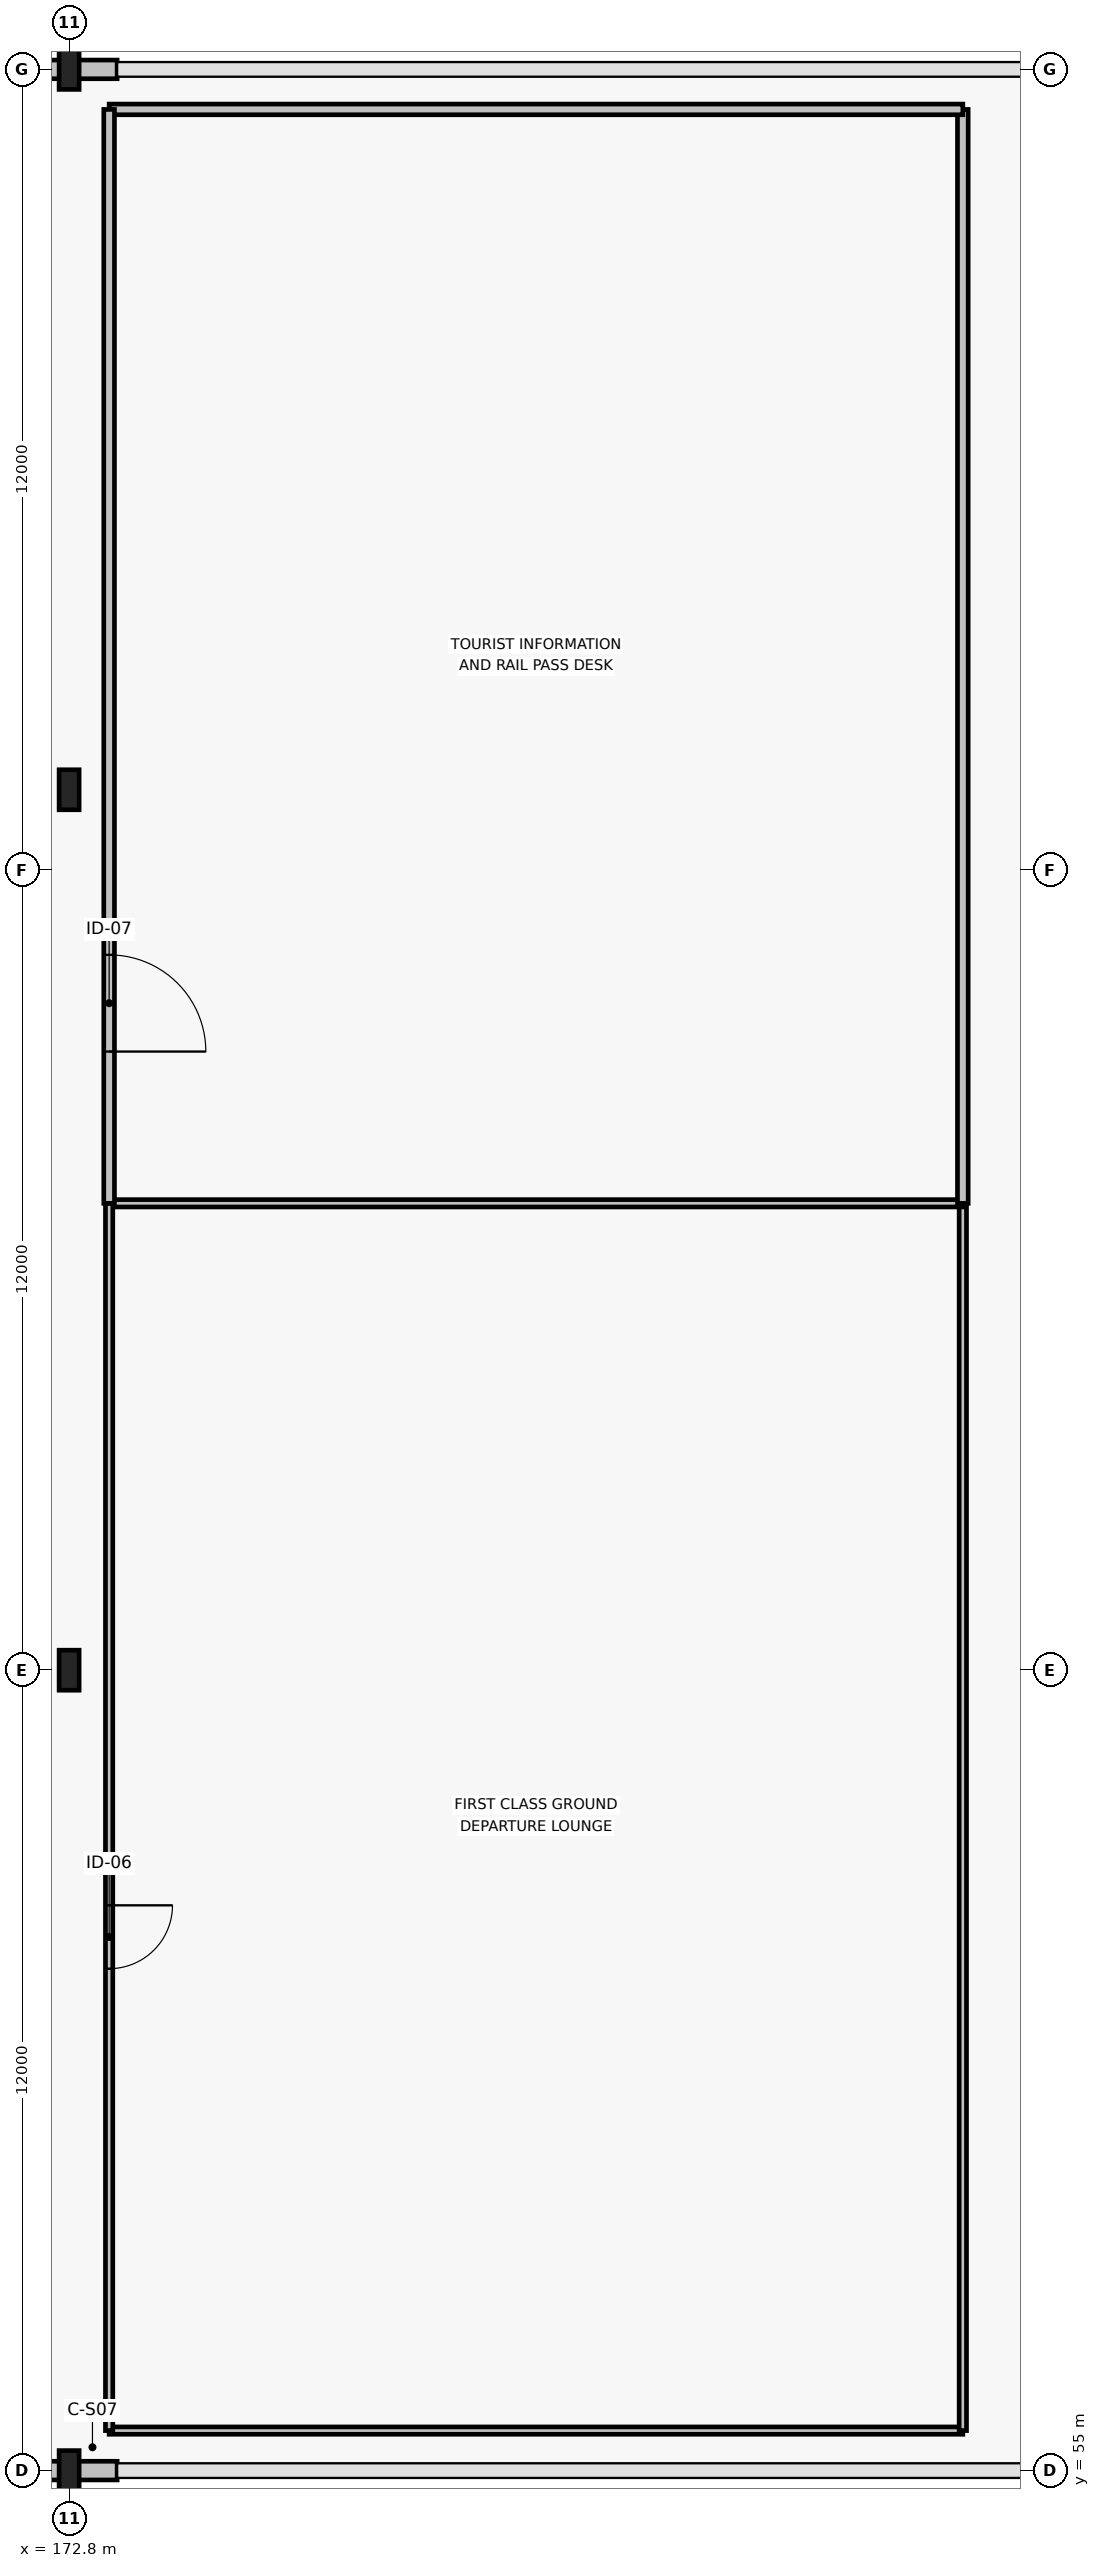
"""IFC4 building model, lengths in metres.
Left out: names, types, materials, properties, quantities, classifications, styles, units other than length and angle.
Written with IfcOpenShell. Run it as: python <this file> out.ifc"""

import sys

from ifc_helpers import new_model, si_unit, direction, frame, frame_2d, origin, origin_2d, place, context, subcontext, project, spatial, rectangle, i_section, extrude, element, fill, save


model = new_model("IFC4")
c1 = context("Model", 3, precision=1e-05, world=origin(), true_north=direction((0.0, 1.0)))
c2 = subcontext(c1, "Body", "Model", "MODEL_VIEW")
j1 = project(units=[si_unit("LENGTHUNIT", "METRE"), si_unit("PLANEANGLEUNIT", "RADIAN")], contexts=[c1])
p1 = place(None, origin())
s1 = spatial("IfcSite", under=j1, at=p1, CompositionType="ELEMENT")
p2 = place(p1, origin())
s2 = spatial("IfcBuilding", under=s1, at=p2, CompositionType="ELEMENT")
p3 = place(p2, origin())
s3 = spatial("IfcBuildingStorey", under=s2, at=p3, CompositionType="ELEMENT", Elevation=0.0)
for number, where, z_axis, x_axis in (
    (1, (172.8, 55.0, 0.0), (0.0, 0.0, 1.0), (1.0, 0.0, 0.0)),
    (2, (172.8, 67.0, 0.0), (0.0, 0.0, 1.0), (1.0, 0.0, 0.0)),
    (3, (172.8, 80.2, 0.0), (0.0, 0.0, 1.0), (1.0, 0.0, 0.0)),
    (4, (172.8, 91.0, 0.0), (0.0, 0.0, 1.0), (1.0, 0.0, 0.0)),
):
    element("IfcColumn", number, at=place(p3, frame(where, z_axis=z_axis, x_axis=x_axis)), inside=s3, PredefinedType="COLUMN", context=c2, shape_type="SweptSolid", body=[
        extrude(i_section(OverallWidth=0.3, OverallDepth=0.6, WebThickness=0.015, FlangeThickness=0.03, FilletRadius=0.027, at=origin_2d()), origin(), (0.0, 0.0, 1.0), 5.4),
    ])
for number, where, z_axis, x_axis in (
    (5, (172.08, 55.0, 0.0), (0.0, 0.0, 1.0), (1.0, 0.0, 0.0)),
    (6, (172.08, 91.0, 0.0), (0.0, 0.0, 1.0), (1.0, 0.0, 0.0)),
    (7, (172.8, 55.0, 0.0), (0.0, 0.0, 1.0), (1.0, 0.0, 0.0)),
    (8, (172.8, 91.0, 0.0), (0.0, 0.0, 1.0), (1.0, 0.0, 0.0)),
):
    element("IfcWall", number, at=place(p3, frame(where, z_axis=z_axis, x_axis=x_axis)), inside=s3, PredefinedType="STANDARD", context=c2, shape_type="SweptSolid", body=[
        extrude(rectangle(XDim=0.72, YDim=0.28, at=frame_2d((0.36, 0.0))), origin(), (0.0, 0.0, 1.0), 4.625),
    ])
p4 = place(p3, frame((173.4, 55.6, 0.0), z_axis=(0.0, 0.0, 1.0), x_axis=(1.0, 0.0, 0.0)))
e9 = element("IfcWall", 9, at=p4, inside=s3, PredefinedType="MOVABLE", context=c2, shape_type="SweptSolid", body=[
    extrude(rectangle(XDim=12.8, YDim=0.11, at=frame_2d((6.4, 0.0))), origin(), (0.0, 0.0, 1.0), 4.625),
])
p5 = place(p3, frame((186.2, 55.6, 0.0), z_axis=(0.0, 0.0, 1.0), x_axis=(0.0, 1.0, 0.0)))
e10 = element("IfcWall", 10, at=p5, inside=s3, PredefinedType="MOVABLE", context=c2, shape_type="SweptSolid", body=[
    extrude(rectangle(XDim=18.4, YDim=0.11, at=frame_2d((9.2, 0.0))), origin(), (0.0, 0.0, 1.0), 5.16),
])
p6 = place(p3, frame((186.2, 74.0, 0.0), z_axis=(0.0, 0.0, 1.0), x_axis=(-1.0, 0.0, 0.0)))
e11 = element("IfcWall", 11, at=p6, inside=s3, PredefinedType="MOVABLE", context=c2, shape_type="SweptSolid", body=[
    extrude(rectangle(XDim=12.8, YDim=0.11, at=frame_2d((6.4, 0.0))), origin(), (0.0, 0.0, 1.0), 5.16),
])
p7 = place(p3, frame((173.4, 74.0, 0.0), z_axis=(0.0, 0.0, 1.0), x_axis=(0.0, -1.0, 0.0)))
e12 = element("IfcWall", 12, at=p7, inside=s3, PredefinedType="MOVABLE", context=c2, shape_type="SweptSolid", body=[
    extrude(rectangle(XDim=18.4, YDim=0.11, at=frame_2d((9.2, 0.0))), origin(), (0.0, 0.0, 1.0), 4.675),
])
p8 = place(p7, frame((10.525, 0.0, 0.0)))
e13 = element("IfcOpeningElement", 13, at=p8, cuts=e12, PredefinedType="OPENING", context=c2, shape_type="SweptSolid", body=[
    extrude(rectangle(XDim=0.95, YDim=2.15, at=frame_2d((0.475, 1.075))), frame((0.0, 0.065, 0.0), z_axis=(0.0, -1.0, 0.0), x_axis=(1.0, 0.0, 0.0)), (0.0, 0.0, 1.0), 0.13),
])
p9 = place(p3, frame((186.2, 74.0, 0.0), z_axis=(0.0, 0.0, 1.0), x_axis=(0.0, 1.0, 0.0)))
e14 = element("IfcWall", 14, at=p9, inside=s3, PredefinedType="PARTITIONING", context=c2, shape_type="SweptSolid", body=[
    extrude(rectangle(XDim=16.4, YDim=0.16, at=frame_2d((8.2, 0.0))), origin(), (0.0, 0.0, 1.0), 5.16),
])
p10 = place(p3, frame((186.2, 90.4, 0.0), z_axis=(0.0, 0.0, 1.0), x_axis=(-1.0, 0.0, 0.0)))
e15 = element("IfcWall", 15, at=p10, inside=s3, PredefinedType="PARTITIONING", context=c2, shape_type="SweptSolid", body=[
    extrude(rectangle(XDim=12.8, YDim=0.16, at=frame_2d((6.4, 0.0))), origin(), (0.0, 0.0, 1.0), 4.625),
])
p11 = place(p3, frame((173.4, 90.4, 0.0), z_axis=(0.0, 0.0, 1.0), x_axis=(0.0, -1.0, 0.0)))
e16 = element("IfcWall", 16, at=p11, inside=s3, PredefinedType="PARTITIONING", context=c2, shape_type="SweptSolid", body=[
    extrude(rectangle(XDim=16.4, YDim=0.16, at=frame_2d((8.2, 0.0))), origin(), (0.0, 0.0, 1.0), 4.625),
])
p12 = place(p11, frame((14.125, 0.0, 0.0), z_axis=(0.0, 0.0, 1.0), x_axis=(-1.0, 0.0, 0.0)))
e17 = element("IfcOpeningElement", 17, at=p12, cuts=e16, PredefinedType="OPENING", context=c2, shape_type="SweptSolid", body=[
    extrude(rectangle(XDim=1.45, YDim=2.25, at=frame_2d((0.725, 1.125))), frame((0.0, 0.09, 0.0), z_axis=(0.0, -1.0, 0.0), x_axis=(1.0, 0.0, 0.0)), (0.0, 0.0, 1.0), 0.18),
])
p13 = place(p8, origin())
e18 = element("IfcDoor", 18, at=p13, inside=s3, OperationType="SINGLE_SWING_LEFT", PredefinedType="DOOR", context=c2, shape_type="SweptSolid", body=[
    extrude(rectangle(XDim=0.95, YDim=2.15, at=frame_2d((0.475, 1.075))), frame((0.0, 0.025, 0.0), z_axis=(0.0, -1.0, 0.0), x_axis=(1.0, 0.0, 0.0)), (0.0, 0.0, 1.0), 0.05),
])
fill(e13, e18)
p14 = place(p12, origin())
e19 = element("IfcDoor", 19, at=p14, inside=s3, OperationType="SINGLE_SWING_RIGHT", PredefinedType="DOOR", context=c2, shape_type="SweptSolid", body=[
    extrude(rectangle(XDim=1.45, YDim=2.25, at=frame_2d((0.725, 1.125))), frame((0.0, 0.025, 0.0), z_axis=(0.0, -1.0, 0.0), x_axis=(1.0, 0.0, 0.0)), (0.0, 0.0, 1.0), 0.05),
])
fill(e17, e19)
save(model, sys.argv[1])
